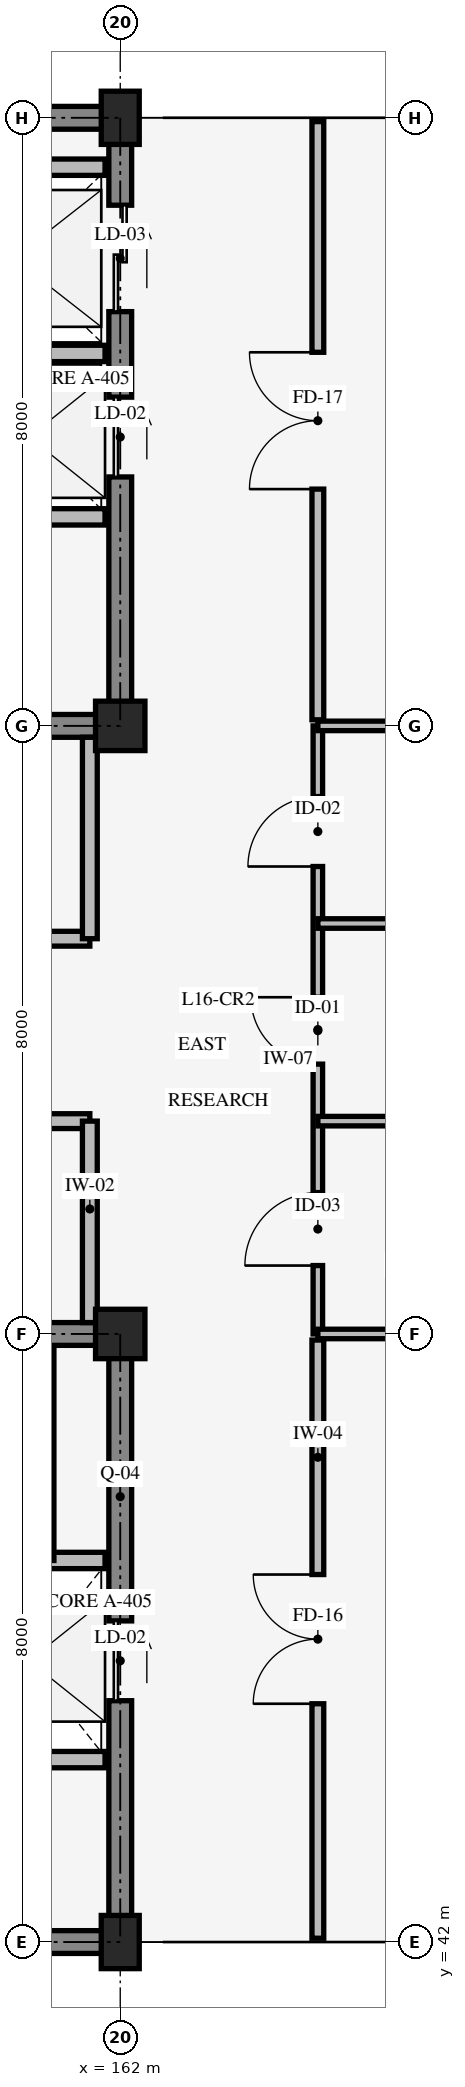
"""IFC4 building model, lengths in metres.
Left out: names, types, materials, properties, quantities, classifications, styles, units other than length and angle.
Written with IfcOpenShell. Run it as: python <this file> out.ifc"""

import sys

from ifc_helpers import new_model, si_unit, direction, frame, frame_2d, origin, origin_2d, place, context, subcontext, project, spatial, rectangle, extrude, element, fill, save


model = new_model("IFC4")
c1 = context("Model", 3, precision=1e-05, world=origin(), true_north=direction((0.0, 1.0)))
c2 = subcontext(c1, "Body", "Model", "MODEL_VIEW")
j1 = project(units=[si_unit("LENGTHUNIT", "METRE"), si_unit("PLANEANGLEUNIT", "RADIAN")], contexts=[c1])
p1 = place(None, origin())
s1 = spatial("IfcSite", under=j1, at=p1, CompositionType="ELEMENT")
p2 = place(p1, origin())
s2 = spatial("IfcBuilding", under=s1, at=p2, CompositionType="ELEMENT")
p3 = place(p2, frame((0.0, 0.0, 65.4)))
s3 = spatial("IfcBuildingStorey", under=s2, at=p3, CompositionType="ELEMENT", Elevation=65.4)
p4 = place(p3, frame((154.0, 42.0, 0.0), z_axis=(0.0, 0.0, 1.0), x_axis=(1.0, 0.0, 0.0)))
e1 = element("IfcWall", 1, at=p4, inside=s3, PredefinedType="SHEAR", context=c2, shape_type="SweptSolid", body=[
    extrude(rectangle(XDim=8.0, YDim=0.3, at=frame_2d((4.0, 0.0))), origin(), (0.0, 0.0, 1.0), 3.95),
])
p5 = place(p3, frame((162.0, 42.0, 0.0), z_axis=(0.0, 0.0, 1.0), x_axis=(0.0, 1.0, 0.0)))
e2 = element("IfcWall", 2, at=p5, inside=s3, PredefinedType="SHEAR", context=c2, shape_type="SweptSolid", body=[
    extrude(rectangle(XDim=8.0, YDim=0.3, at=frame_2d((4.0, 0.0))), origin(), (0.0, 0.0, 1.0), 3.95),
])
p6 = place(p5, frame((3.175, 0.0, 0.0)))
e3 = element("IfcOpeningElement", 3, at=p6, cuts=e2, PredefinedType="OPENING", context=c2, shape_type="SweptSolid", body=[
    extrude(rectangle(XDim=1.05, YDim=2.2, at=frame_2d((0.525, 1.1))), frame((0.0, 0.16, 0.0), z_axis=(0.0, -1.0, 0.0), x_axis=(1.0, 0.0, 0.0)), (0.0, 0.0, 1.0), 0.32),
])
p7 = place(p3, frame((162.0, 50.0, 0.0), z_axis=(0.0, 0.0, 1.0), x_axis=(-1.0, 0.0, 0.0)))
e4 = element("IfcWall", 4, at=p7, inside=s3, PredefinedType="SHEAR", context=c2, shape_type="SweptSolid", body=[
    extrude(rectangle(XDim=8.0, YDim=0.3, at=frame_2d((4.0, 0.0))), origin(), (0.0, 0.0, 1.0), 3.95),
])
p8 = place(p7, frame((5.3, 0.0, 0.0)))
e5 = element("IfcOpeningElement", 5, at=p8, cuts=e4, PredefinedType="OPENING", context=c2, shape_type="SweptSolid", body=[
    extrude(rectangle(XDim=1.3, YDim=2.15, at=frame_2d((0.65, 1.075))), frame((0.0, 0.16, 0.0), z_axis=(0.0, -1.0, 0.0), x_axis=(1.0, 0.0, 0.0)), (0.0, 0.0, 1.0), 0.32),
])
p9 = place(p7, frame((1.45, 0.0, 0.0)))
e6 = element("IfcOpeningElement", 6, at=p9, cuts=e4, PredefinedType="OPENING", context=c2, shape_type="SweptSolid", body=[
    extrude(rectangle(XDim=1.1, YDim=2.2, at=frame_2d((0.55, 1.1))), frame((0.0, 0.16, 0.0), z_axis=(0.0, -1.0, 0.0), x_axis=(1.0, 0.0, 0.0)), (0.0, 0.0, 1.0), 0.32),
])
p10 = place(p3, frame((154.0, 58.0, 0.0), z_axis=(0.0, 0.0, 1.0), x_axis=(1.0, 0.0, 0.0)))
e7 = element("IfcWall", 7, at=p10, inside=s3, PredefinedType="SHEAR", context=c2, shape_type="SweptSolid", body=[
    extrude(rectangle(XDim=8.0, YDim=0.3, at=frame_2d((4.0, 0.0))), origin(), (0.0, 0.0, 1.0), 3.95),
])
p11 = place(p10, frame((1.4, 0.0, 0.0)))
e8 = element("IfcOpeningElement", 8, at=p11, cuts=e7, PredefinedType="OPENING", context=c2, shape_type="SweptSolid", body=[
    extrude(rectangle(XDim=1.3, YDim=2.15, at=frame_2d((0.65, 1.075))), frame((0.0, 0.16, 0.0), z_axis=(0.0, -1.0, 0.0), x_axis=(1.0, 0.0, 0.0)), (0.0, 0.0, 1.0), 0.32),
])
p12 = place(p10, frame((5.3, 0.0, 0.0)))
e9 = element("IfcOpeningElement", 9, at=p12, cuts=e7, PredefinedType="OPENING", context=c2, shape_type="SweptSolid", body=[
    extrude(rectangle(XDim=1.1, YDim=2.2, at=frame_2d((0.55, 1.1))), frame((0.0, 0.16, 0.0), z_axis=(0.0, -1.0, 0.0), x_axis=(1.0, 0.0, 0.0)), (0.0, 0.0, 1.0), 0.32),
])
p13 = place(p3, frame((162.0, 58.0, 0.0), z_axis=(0.0, 0.0, 1.0), x_axis=(0.0, 1.0, 0.0)))
e10 = element("IfcWall", 10, at=p13, inside=s3, PredefinedType="SHEAR", context=c2, shape_type="SweptSolid", body=[
    extrude(rectangle(XDim=8.0, YDim=0.3, at=frame_2d((4.0, 0.0))), origin(), (0.0, 0.0, 1.0), 3.95),
])
p14 = place(p13, frame((3.275, 0.0, 0.0)))
e11 = element("IfcOpeningElement", 11, at=p14, cuts=e10, PredefinedType="OPENING", context=c2, shape_type="SweptSolid", body=[
    extrude(rectangle(XDim=1.05, YDim=2.2, at=frame_2d((0.525, 1.1))), frame((0.0, 0.16, 0.0), z_axis=(0.0, -1.0, 0.0), x_axis=(1.0, 0.0, 0.0)), (0.0, 0.0, 1.0), 0.32),
])
p15 = place(p13, frame((5.45, 0.0, 0.0)))
e12 = element("IfcOpeningElement", 12, at=p15, cuts=e10, PredefinedType="OPENING", context=c2, shape_type="SweptSolid", body=[
    extrude(rectangle(XDim=1.4, YDim=2.3, at=frame_2d((0.7, 1.15))), frame((0.0, 0.16, 0.0), z_axis=(0.0, -1.0, 0.0), x_axis=(1.0, 0.0, 0.0)), (0.0, 0.0, 1.0), 0.32),
])
p16 = place(p3, frame((162.0, 66.0, 0.0), z_axis=(0.0, 0.0, 1.0), x_axis=(-1.0, 0.0, 0.0)))
e13 = element("IfcWall", 13, at=p16, inside=s3, PredefinedType="SHEAR", context=c2, shape_type="SweptSolid", body=[
    extrude(rectangle(XDim=8.0, YDim=0.3, at=frame_2d((4.0, 0.0))), origin(), (0.0, 0.0, 1.0), 3.95),
])
p17 = place(p3, frame((162.0, 42.0, 0.0), z_axis=(0.0, 0.0, 1.0), x_axis=(1.0, 0.0, 0.0)))
e14 = element("IfcColumn", 14, at=p17, inside=s3, PredefinedType="COLUMN", context=c2, shape_type="SweptSolid", body=[
    extrude(rectangle(XDim=0.5, YDim=0.7, at=origin_2d()), origin(), (0.0, 0.0, 1.0), 4.2),
])
for number, where, z_axis, x_axis in (
    (15, (162.0, 50.0, 0.0), (0.0, 0.0, 1.0), (1.0, 0.0, 0.0)),
    (16, (162.0, 58.0, 0.0), (0.0, 0.0, 1.0), (1.0, 0.0, 0.0)),
):
    element("IfcColumn", number, at=place(p3, frame(where, z_axis=z_axis, x_axis=x_axis)), inside=s3, PredefinedType="COLUMN", context=c2, shape_type="SweptSolid", body=[
        extrude(rectangle(XDim=0.65, YDim=0.65, at=origin_2d()), origin(), (0.0, 0.0, 1.0), 4.2),
    ])
p18 = place(p3, frame((162.0, 66.0, 0.0), z_axis=(0.0, 0.0, 1.0), x_axis=(1.0, 0.0, 0.0)))
e17 = element("IfcColumn", 17, at=p18, inside=s3, PredefinedType="COLUMN", context=c2, shape_type="SweptSolid", body=[
    extrude(rectangle(XDim=0.5, YDim=0.7, at=origin_2d()), origin(), (0.0, 0.0, 1.0), 4.2),
])
p19 = place(p3, frame((158.45, 47.02, 0.0), z_axis=(0.0, 0.0, 1.0), x_axis=(1.0, 0.0, 0.0)))
e18 = element("IfcWall", 18, at=p19, inside=s3, PredefinedType="STANDARD", context=c2, shape_type="SweptSolid", body=[
    extrude(rectangle(XDim=3.35, YDim=0.215, at=frame_2d((1.675, 0.0))), origin(), (0.0, 0.0, 1.0), 3.9),
])
p20 = place(p3, frame((161.02, 47.02, 0.0), z_axis=(0.0, 0.0, 1.0), x_axis=(0.0, 1.0, 0.0)))
e19 = element("IfcWall", 19, at=p20, inside=s3, PredefinedType="STANDARD", context=c2, shape_type="SweptSolid", body=[
    extrude(rectangle(XDim=2.78, YDim=0.215, at=frame_2d((1.39, 0.0))), origin(), (0.0, 0.0, 1.0), 3.9),
])
p21 = place(p3, frame((159.78, 44.4, 0.0), z_axis=(0.0, 0.0, 1.0), x_axis=(1.0, 0.0, 0.0)))
e20 = element("IfcWall", 20, at=p21, inside=s3, PredefinedType="STANDARD", context=c2, shape_type="SweptSolid", body=[
    extrude(rectangle(XDim=2.02, YDim=0.215, at=frame_2d((1.01, 0.0))), origin(), (0.0, 0.0, 1.0), 3.9),
])
p22 = place(p3, frame((158.45, 62.9, 0.0), z_axis=(0.0, 0.0, 1.0), x_axis=(1.0, 0.0, 0.0)))
e21 = element("IfcWall", 21, at=p22, inside=s3, PredefinedType="STANDARD", context=c2, shape_type="SweptSolid", body=[
    extrude(rectangle(XDim=3.35, YDim=0.215, at=frame_2d((1.675, 0.0))), origin(), (0.0, 0.0, 1.0), 3.9),
])
p23 = place(p3, frame((159.38, 65.35, 0.0), z_axis=(0.0, 0.0, 1.0), x_axis=(1.0, 0.0, 0.0)))
e22 = element("IfcWall", 22, at=p23, inside=s3, PredefinedType="STANDARD", context=c2, shape_type="SweptSolid", body=[
    extrude(rectangle(XDim=2.42, YDim=0.215, at=frame_2d((1.21, 0.0))), origin(), (0.0, 0.0, 1.0), 3.9),
])
p24 = place(p3, frame((158.45, 60.75, 0.0), z_axis=(0.0, 0.0, 1.0), x_axis=(1.0, 0.0, 0.0)))
e23 = element("IfcWall", 23, at=p24, inside=s3, PredefinedType="STANDARD", context=c2, shape_type="SweptSolid", body=[
    extrude(rectangle(XDim=3.35, YDim=0.215, at=frame_2d((1.675, 0.0))), origin(), (0.0, 0.0, 1.0), 3.9),
])
p25 = place(p3, frame((154.0, 52.8, 0.0), z_axis=(0.0, 0.0, 1.0), x_axis=(1.0, 0.0, 0.0)))
e24 = element("IfcWall", 24, at=p25, inside=s3, PredefinedType="STANDARD", context=c2, shape_type="SweptSolid", body=[
    extrude(rectangle(XDim=7.6, YDim=0.195, at=frame_2d((3.8, 0.0))), origin(), (0.0, 0.0, 1.0), 3.9),
])
p26 = place(p25, frame((2.8, 0.0, 0.0)))
e25 = element("IfcOpeningElement", 25, at=p26, cuts=e24, PredefinedType="OPENING", context=c2, shape_type="SweptSolid", body=[
    extrude(rectangle(XDim=1.4, YDim=2.2, at=frame_2d((0.7, 1.1))), frame((0.0, 0.107, 0.0), z_axis=(0.0, -1.0, 0.0), x_axis=(1.0, 0.0, 0.0)), (0.0, 0.0, 1.0), 0.215),
])
p27 = place(p3, frame((161.6, 50.15, 0.0), z_axis=(0.0, 0.0, 1.0), x_axis=(0.0, 1.0, 0.0)))
e26 = element("IfcWall", 26, at=p27, inside=s3, PredefinedType="STANDARD", context=c2, shape_type="SweptSolid", body=[
    extrude(rectangle(XDim=2.65, YDim=0.195, at=frame_2d((1.325, 0.0))), origin(), (0.0, 0.0, 1.0), 3.29),
])
p28 = place(p3, frame((154.0, 55.2, 0.0), z_axis=(0.0, 0.0, 1.0), x_axis=(1.0, 0.0, 0.0)))
e27 = element("IfcWall", 27, at=p28, inside=s3, PredefinedType="STANDARD", context=c2, shape_type="SweptSolid", body=[
    extrude(rectangle(XDim=7.6, YDim=0.195, at=frame_2d((3.8, 0.0))), origin(), (0.0, 0.0, 1.0), 3.9),
])
p29 = place(p28, frame((2.8, 0.0, 0.0)))
e28 = element("IfcOpeningElement", 28, at=p29, cuts=e27, PredefinedType="OPENING", context=c2, shape_type="SweptSolid", body=[
    extrude(rectangle(XDim=1.2, YDim=2.1, at=frame_2d((0.6, 1.05))), frame((0.0, 0.107, 0.0), z_axis=(0.0, -1.0, 0.0), x_axis=(1.0, 0.0, 0.0)), (0.0, 0.0, 1.0), 0.215),
])
p30 = place(p3, frame((161.6, 55.2, 0.0), z_axis=(0.0, 0.0, 1.0), x_axis=(0.0, 1.0, 0.0)))
e29 = element("IfcWall", 29, at=p30, inside=s3, PredefinedType="STANDARD", context=c2, shape_type="SweptSolid", body=[
    extrude(rectangle(XDim=2.65, YDim=0.195, at=frame_2d((1.325, 0.0))), origin(), (0.0, 0.0, 1.0), 3.29),
])
p31 = place(p3, frame((164.6, 50.0, 0.0), z_axis=(0.0, 0.0, 1.0), x_axis=(0.0, 1.0, 0.0)))
e30 = element("IfcWall", 30, at=p31, inside=s3, PredefinedType="STANDARD", context=c2, shape_type="SweptSolid", body=[
    extrude(rectangle(XDim=8.0, YDim=0.125, at=frame_2d((4.0, 0.0))), origin(), (0.0, 0.0, 1.0), 3.9),
])
p32 = place(p31, frame((0.9, 0.0, 0.0)))
e31 = element("IfcOpeningElement", 31, at=p32, cuts=e30, PredefinedType="OPENING", context=c2, shape_type="SweptSolid", body=[
    extrude(rectangle(XDim=0.96, YDim=2.08, at=frame_2d((0.48, 1.04))), frame((0.0, 0.073, 0.0), z_axis=(0.0, -1.0, 0.0), x_axis=(1.0, 0.0, 0.0)), (0.0, 0.0, 1.0), 0.145),
])
p33 = place(p31, frame((3.55, 0.0, 0.0)))
e32 = element("IfcOpeningElement", 32, at=p33, cuts=e30, PredefinedType="OPENING", context=c2, shape_type="SweptSolid", body=[
    extrude(rectangle(XDim=0.88, YDim=2.05, at=frame_2d((0.44, 1.025))), frame((0.0, 0.073, 0.0), z_axis=(0.0, -1.0, 0.0), x_axis=(1.0, 0.0, 0.0)), (0.0, 0.0, 1.0), 0.145),
])
p34 = place(p31, frame((6.15, 0.0, 0.0)))
e33 = element("IfcOpeningElement", 33, at=p34, cuts=e30, PredefinedType="OPENING", context=c2, shape_type="SweptSolid", body=[
    extrude(rectangle(XDim=0.92, YDim=2.05, at=frame_2d((0.46, 1.025))), frame((0.0, 0.073, 0.0), z_axis=(0.0, -1.0, 0.0), x_axis=(1.0, 0.0, 0.0)), (0.0, 0.0, 1.0), 0.145),
])
p35 = place(p3, frame((164.6, 50.0, 0.0), z_axis=(0.0, 0.0, 1.0), x_axis=(1.0, 0.0, 0.0)))
e34 = element("IfcWall", 34, at=p35, inside=s3, PredefinedType="STANDARD", context=c2, shape_type="SweptSolid", body=[
    extrude(rectangle(XDim=3.8, YDim=0.125, at=frame_2d((1.9, 0.0))), origin(), (0.0, 0.0, 1.0), 3.24),
])
for number, where, z_axis, x_axis in (
    (35, (164.6, 52.8, 0.0), (0.0, 0.0, 1.0), (1.0, 0.0, 0.0)),
    (36, (164.6, 55.4, 0.0), (0.0, 0.0, 1.0), (1.0, 0.0, 0.0)),
):
    element("IfcWall", number, at=place(p3, frame(where, z_axis=z_axis, x_axis=x_axis)), inside=s3, PredefinedType="STANDARD", context=c2, shape_type="SweptSolid", body=[
        extrude(rectangle(XDim=3.8, YDim=0.125, at=frame_2d((1.9, 0.0))), origin(), (0.0, 0.0, 1.0), 3.9),
    ])
p36 = place(p3, frame((164.6, 58.0, 0.0), z_axis=(0.0, 0.0, 1.0), x_axis=(1.0, 0.0, 0.0)))
e37 = element("IfcWall", 37, at=p36, inside=s3, PredefinedType="STANDARD", context=c2, shape_type="SweptSolid", body=[
    extrude(rectangle(XDim=3.8, YDim=0.125, at=frame_2d((1.9, 0.0))), origin(), (0.0, 0.0, 1.0), 3.24),
])
p37 = place(p3, frame((164.6, 42.05, 0.0), z_axis=(0.0, 0.0, 1.0), x_axis=(0.0, 1.0, 0.0)))
e38 = element("IfcWall", 38, at=p37, inside=s3, PredefinedType="STANDARD", context=c2, shape_type="SweptSolid", body=[
    extrude(rectangle(XDim=7.87, YDim=0.155, at=frame_2d((3.935, 0.0))), origin(), (0.0, 0.0, 1.0), 3.9),
])
p38 = place(p37, frame((3.085, 0.0, 0.0)))
e39 = element("IfcOpeningElement", 39, at=p38, cuts=e38, PredefinedType="OPENING", context=c2, shape_type="SweptSolid", body=[
    extrude(rectangle(XDim=1.7, YDim=2.3, at=frame_2d((0.85, 1.15))), frame((0.0, 0.087, 0.0), z_axis=(0.0, -1.0, 0.0), x_axis=(1.0, 0.0, 0.0)), (0.0, 0.0, 1.0), 0.175),
])
p39 = place(p3, frame((164.6, 58.08, 0.0), z_axis=(0.0, 0.0, 1.0), x_axis=(0.0, 1.0, 0.0)))
e40 = element("IfcWall", 40, at=p39, inside=s3, PredefinedType="STANDARD", context=c2, shape_type="SweptSolid", body=[
    extrude(rectangle(XDim=7.87, YDim=0.155, at=frame_2d((3.935, 0.0))), origin(), (0.0, 0.0, 1.0), 3.9),
])
p40 = place(p39, frame((3.035, 0.0, 0.0)))
e41 = element("IfcOpeningElement", 41, at=p40, cuts=e40, PredefinedType="OPENING", context=c2, shape_type="SweptSolid", body=[
    extrude(rectangle(XDim=1.8, YDim=2.3, at=frame_2d((0.9, 1.15))), frame((0.0, 0.087, 0.0), z_axis=(0.0, -1.0, 0.0), x_axis=(1.0, 0.0, 0.0)), (0.0, 0.0, 1.0), 0.175),
])
p41 = place(p6, origin())
e42 = element("IfcDoor", 42, at=p41, inside=s3, OperationType="SLIDING_TO_LEFT", PredefinedType="DOOR", context=c2, shape_type="SweptSolid", body=[
    extrude(rectangle(XDim=1.05, YDim=2.2, at=frame_2d((0.525, 1.1))), frame((0.0, 0.025, 0.0), z_axis=(0.0, -1.0, 0.0), x_axis=(1.0, 0.0, 0.0)), (0.0, 0.0, 1.0), 0.05),
])
fill(e3, e42)
p42 = place(p14, origin())
e43 = element("IfcDoor", 43, at=p42, inside=s3, OperationType="SLIDING_TO_RIGHT", PredefinedType="DOOR", context=c2, shape_type="SweptSolid", body=[
    extrude(rectangle(XDim=1.05, YDim=2.2, at=frame_2d((0.525, 1.1))), frame((0.0, 0.025, 0.0), z_axis=(0.0, -1.0, 0.0), x_axis=(1.0, 0.0, 0.0)), (0.0, 0.0, 1.0), 0.05),
])
fill(e11, e43)
p43 = place(p15, origin())
e44 = element("IfcDoor", 44, at=p43, inside=s3, OperationType="DOUBLE_DOOR_SLIDING", PredefinedType="DOOR", context=c2, shape_type="SweptSolid", body=[
    extrude(rectangle(XDim=1.4, YDim=2.3, at=frame_2d((0.7, 1.15))), frame((0.0, 0.025, 0.0), z_axis=(0.0, -1.0, 0.0), x_axis=(1.0, 0.0, 0.0)), (0.0, 0.0, 1.0), 0.05),
])
fill(e12, e44)
p44 = place(p32, origin())
e45 = element("IfcDoor", 45, at=p44, inside=s3, OperationType="SINGLE_SWING_LEFT", PredefinedType="DOOR", context=c2, shape_type="SweptSolid", body=[
    extrude(rectangle(XDim=0.96, YDim=2.08, at=frame_2d((0.48, 1.04))), frame((0.0, 0.025, 0.0), z_axis=(0.0, -1.0, 0.0), x_axis=(1.0, 0.0, 0.0)), (0.0, 0.0, 1.0), 0.05),
])
fill(e31, e45)
p45 = place(p33, origin())
e46 = element("IfcDoor", 46, at=p45, inside=s3, OperationType="SINGLE_SWING_RIGHT", PredefinedType="DOOR", context=c2, shape_type="SweptSolid", body=[
    extrude(rectangle(XDim=0.88, YDim=2.05, at=frame_2d((0.44, 1.025))), frame((0.0, 0.025, 0.0), z_axis=(0.0, -1.0, 0.0), x_axis=(1.0, 0.0, 0.0)), (0.0, 0.0, 1.0), 0.05),
])
fill(e32, e46)
p46 = place(p34, origin())
e47 = element("IfcDoor", 47, at=p46, inside=s3, OperationType="SINGLE_SWING_LEFT", PredefinedType="DOOR", context=c2, shape_type="SweptSolid", body=[
    extrude(rectangle(XDim=0.92, YDim=2.05, at=frame_2d((0.46, 1.025))), frame((0.0, 0.025, 0.0), z_axis=(0.0, -1.0, 0.0), x_axis=(1.0, 0.0, 0.0)), (0.0, 0.0, 1.0), 0.05),
])
fill(e33, e47)
p47 = place(p38, origin())
e48 = element("IfcDoor", 48, at=p47, inside=s3, OperationType="DOUBLE_DOOR_SINGLE_SWING", PredefinedType="DOOR", context=c2, shape_type="SweptSolid", body=[
    extrude(rectangle(XDim=1.7, YDim=2.3, at=frame_2d((0.85, 1.15))), frame((0.0, 0.025, 0.0), z_axis=(0.0, -1.0, 0.0), x_axis=(1.0, 0.0, 0.0)), (0.0, 0.0, 1.0), 0.05),
])
fill(e39, e48)
p48 = place(p40, origin())
e49 = element("IfcDoor", 49, at=p48, inside=s3, OperationType="DOUBLE_DOOR_SINGLE_SWING", PredefinedType="DOOR", context=c2, shape_type="SweptSolid", body=[
    extrude(rectangle(XDim=1.8, YDim=2.3, at=frame_2d((0.9, 1.15))), frame((0.0, 0.025, 0.0), z_axis=(0.0, -1.0, 0.0), x_axis=(1.0, 0.0, 0.0)), (0.0, 0.0, 1.0), 0.05),
])
fill(e41, e49)
save(model, sys.argv[1])
